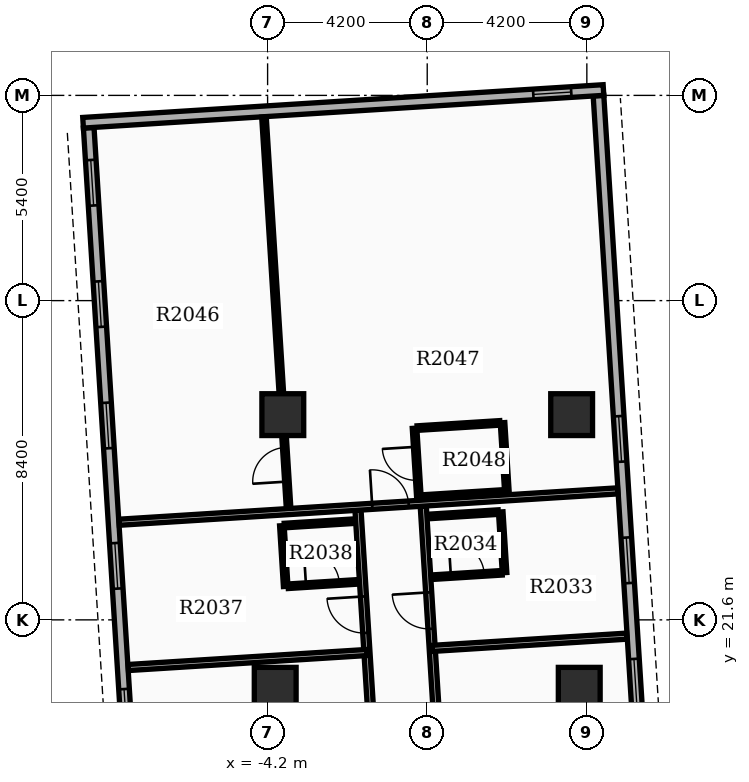
"""IFC4 building model, lengths in metres.
Left out: names, types, materials, properties, quantities, classifications, styles, units other than length and angle.
Written with IfcOpenShell. Run it as: python <this file> out.ifc"""

import sys

from ifc_helpers import new_model, si_unit, direction, frame, frame_2d, origin, origin_2d, place, context, subcontext, project, spatial, rectangle, extrude, element, fill, save


model = new_model("IFC4")
c1 = context("Model", 3, precision=1e-05, world=origin(), true_north=direction((0.0, 1.0)))
c2 = subcontext(c1, "Body", "Model", "MODEL_VIEW")
j1 = project(units=[si_unit("LENGTHUNIT", "METRE"), si_unit("PLANEANGLEUNIT", "RADIAN")], contexts=[c1])
p1 = place(None, origin())
s1 = spatial("IfcSite", under=j1, at=p1, CompositionType="ELEMENT")
p2 = place(p1, origin())
s2 = spatial("IfcBuilding", under=s1, at=p2, CompositionType="ELEMENT")
p3 = place(p2, frame((0.0, 0.0, 128.1)))
s3 = spatial("IfcBuildingStorey", under=s2, at=p3, CompositionType="ELEMENT", Elevation=128.1)
for number, where, z_axis, x_axis in (
    (1, (-4.0, 19.8, 0.0), (0.0, 0.0, 1.0), (1.0, 0.0, 0.0)),
    (2, (4.0, 19.8, 0.0), (0.0, 0.0, 1.0), (1.0, 0.0, 0.0)),
    (3, (-3.8, 27.0, 0.0), (0.0, 0.0, 1.0), (1.0, 0.0, 0.0)),
    (4, (3.8, 27.0, 0.0), (0.0, 0.0, 1.0), (1.0, 0.0, 0.0)),
):
    element("IfcColumn", number, at=place(p3, frame(where, z_axis=z_axis, x_axis=x_axis)), inside=s3, PredefinedType="COLUMN", context=c2, shape_type="SweptSolid", body=[
        extrude(rectangle(XDim=1.1, YDim=1.1, at=origin_2d()), origin(), (0.0, 0.0, 1.0), 3.9),
    ])
p4 = place(p3, frame((5.769, 15.333, 0.0), z_axis=(0.0, 0.0, 1.0), x_axis=(-0.062784355807, 0.998027116198, 0.0)))
e5 = element("IfcWall", 5, at=p4, inside=s3, PredefinedType="STANDARD", context=c2, shape_type="SweptSolid", body=[
    extrude(rectangle(XDim=20.1, YDim=0.28, at=frame_2d((10.05, 0.0))), origin(), (0.0, 0.0, 1.0), 2.97),
])
p5 = place(p4, frame((0.85, 0.0, 0.8)))
e6 = element("IfcOpeningElement", 6, at=p5, cuts=e5, PredefinedType="OPENING", context=c2, shape_type="SweptSolid", body=[
    extrude(rectangle(XDim=1.2, YDim=1.6, at=frame_2d((0.6, 0.8))), frame((0.0, 0.15, 0.0), z_axis=(0.0, -1.0, 0.0), x_axis=(1.0, 0.0, 0.0)), (0.0, 0.0, 1.0), 0.3),
])
p6 = place(p4, frame((4.05, 0.0, 0.8)))
e7 = element("IfcOpeningElement", 7, at=p6, cuts=e5, PredefinedType="OPENING", context=c2, shape_type="SweptSolid", body=[
    extrude(rectangle(XDim=1.2, YDim=1.6, at=frame_2d((0.6, 0.8))), frame((0.0, 0.15, 0.0), z_axis=(0.0, -1.0, 0.0), x_axis=(1.0, 0.0, 0.0)), (0.0, 0.0, 1.0), 0.3),
])
p7 = place(p4, frame((7.25, 0.0, 0.8)))
e8 = element("IfcOpeningElement", 8, at=p7, cuts=e5, PredefinedType="OPENING", context=c2, shape_type="SweptSolid", body=[
    extrude(rectangle(XDim=1.2, YDim=1.6, at=frame_2d((0.6, 0.8))), frame((0.0, 0.15, 0.0), z_axis=(0.0, -1.0, 0.0), x_axis=(1.0, 0.0, 0.0)), (0.0, 0.0, 1.0), 0.3),
])
p8 = place(p4, frame((10.45, 0.0, 0.8)))
e9 = element("IfcOpeningElement", 9, at=p8, cuts=e5, PredefinedType="OPENING", context=c2, shape_type="SweptSolid", body=[
    extrude(rectangle(XDim=1.2, YDim=1.6, at=frame_2d((0.6, 0.8))), frame((0.0, 0.15, 0.0), z_axis=(0.0, -1.0, 0.0), x_axis=(1.0, 0.0, 0.0)), (0.0, 0.0, 1.0), 0.3),
])
p9 = place(p3, frame((-8.907, 34.549, 0.0), z_axis=(0.0, 0.0, 1.0), x_axis=(0.06279645424, -0.99802635503, 0.0)))
e10 = element("IfcWall", 10, at=p9, inside=s3, PredefinedType="STANDARD", context=c2, shape_type="SweptSolid", body=[
    extrude(rectangle(XDim=20.1, YDim=0.28, at=frame_2d((10.05, 0.0))), origin(), (0.0, 0.0, 1.0), 2.97),
])
p10 = place(p9, frame((0.85, 0.0, 0.8)))
e11 = element("IfcOpeningElement", 11, at=p10, cuts=e10, PredefinedType="OPENING", context=c2, shape_type="SweptSolid", body=[
    extrude(rectangle(XDim=1.2, YDim=1.6, at=frame_2d((0.6, 0.8))), frame((0.0, 0.15, 0.0), z_axis=(0.0, -1.0, 0.0), x_axis=(1.0, 0.0, 0.0)), (0.0, 0.0, 1.0), 0.3),
])
p11 = place(p9, frame((4.05, 0.0, 0.8)))
e12 = element("IfcOpeningElement", 12, at=p11, cuts=e10, PredefinedType="OPENING", context=c2, shape_type="SweptSolid", body=[
    extrude(rectangle(XDim=1.2, YDim=1.6, at=frame_2d((0.6, 0.8))), frame((0.0, 0.15, 0.0), z_axis=(0.0, -1.0, 0.0), x_axis=(1.0, 0.0, 0.0)), (0.0, 0.0, 1.0), 0.3),
])
p12 = place(p9, frame((7.25, 0.0, 0.8)))
e13 = element("IfcOpeningElement", 13, at=p12, cuts=e10, PredefinedType="OPENING", context=c2, shape_type="SweptSolid", body=[
    extrude(rectangle(XDim=1.2, YDim=1.6, at=frame_2d((0.6, 0.8))), frame((0.0, 0.15, 0.0), z_axis=(0.0, -1.0, 0.0), x_axis=(1.0, 0.0, 0.0)), (0.0, 0.0, 1.0), 0.3),
])
p13 = place(p9, frame((10.95, 0.0, 0.8)))
e14 = element("IfcOpeningElement", 14, at=p13, cuts=e10, PredefinedType="OPENING", context=c2, shape_type="SweptSolid", body=[
    extrude(rectangle(XDim=1.2, YDim=1.6, at=frame_2d((0.6, 0.8))), frame((0.0, 0.15, 0.0), z_axis=(0.0, -1.0, 0.0), x_axis=(1.0, 0.0, 0.0)), (0.0, 0.0, 1.0), 0.3),
])
p14 = place(p9, frame((14.799, 0.0, 0.85)))
e15 = element("IfcOpeningElement", 15, at=p14, cuts=e10, PredefinedType="OPENING", context=c2, shape_type="SweptSolid", body=[
    extrude(rectangle(XDim=1.2, YDim=1.6, at=frame_2d((0.6, 0.8))), frame((0.0, 0.15, 0.0), z_axis=(0.0, -1.0, 0.0), x_axis=(1.0, 0.0, 0.0)), (0.0, 0.0, 1.0), 0.3),
])
p15 = place(p3, frame((4.637, 35.541, 0.0), z_axis=(0.0, 0.0, 1.0), x_axis=(-0.998026318072, -0.062797041623, 0.0)))
e16 = element("IfcWall", 16, at=p15, inside=s3, PredefinedType="STANDARD", context=c2, shape_type="SweptSolid", body=[
    extrude(rectangle(XDim=13.72, YDim=0.28, at=frame_2d((6.86, 0.0))), origin(), (0.0, 0.0, 1.0), 2.97),
])
p16 = place(p15, frame((0.85, 0.0, 0.85)))
e17 = element("IfcOpeningElement", 17, at=p16, cuts=e16, PredefinedType="OPENING", context=c2, shape_type="SweptSolid", body=[
    extrude(rectangle(XDim=1.0, YDim=1.5, at=frame_2d((0.5, 0.75))), frame((0.0, 0.15, 0.0), z_axis=(0.0, -1.0, 0.0), x_axis=(1.0, 0.0, 0.0)), (0.0, 0.0, 1.0), 0.3),
])
p17 = place(p3, frame((0.505, 14.911, 0.0), z_axis=(0.0, 0.0, 1.0), x_axis=(-0.062771584278, 0.998027919553, 0.0)))
e18 = element("IfcWall", 18, at=p17, inside=s3, PredefinedType="PARTITIONING", context=c2, shape_type="SweptSolid", body=[
    extrude(rectangle(XDim=9.7, YDim=0.16, at=frame_2d((4.85, 0.0))), origin(), (0.0, 0.0, 1.0), 2.96),
])
p18 = place(p17, frame((2.575, 0.0, 0.0)))
e19 = element("IfcOpeningElement", 19, at=p18, cuts=e18, PredefinedType="OPENING", context=c2, shape_type="SweptSolid", body=[
    extrude(rectangle(XDim=0.96, YDim=2.15, at=frame_2d((0.48, 1.075))), frame((0.0, 0.09, 0.0), z_axis=(0.0, -1.0, 0.0), x_axis=(1.0, 0.0, 0.0)), (0.0, 0.0, 1.0), 0.18),
])
p19 = place(p17, frame((6.467, 0.0, 0.0)))
e20 = element("IfcOpeningElement", 20, at=p19, cuts=e18, PredefinedType="OPENING", context=c2, shape_type="SweptSolid", body=[
    extrude(rectangle(XDim=0.96, YDim=2.15, at=frame_2d((0.48, 1.075))), frame((0.0, 0.09, 0.0), z_axis=(0.0, -1.0, 0.0), x_axis=(1.0, 0.0, 0.0)), (0.0, 0.0, 1.0), 0.18),
])
p20 = place(p3, frame((0.131, 20.849, 0.0), z_axis=(0.0, 0.0, 1.0), x_axis=(0.998026390953, 0.062795883315, 0.0)))
e21 = element("IfcWall", 21, at=p20, inside=s3, PredefinedType="PARTITIONING", context=c2, shape_type="SweptSolid", body=[
    extrude(rectangle(XDim=5.132, YDim=0.16, at=frame_2d((2.566, 0.0))), origin(), (0.0, 0.0, 1.0), 2.96),
])
p21 = place(p3, frame((0.153, 22.725, 0.0), z_axis=(0.0, 0.0, 1.0), x_axis=(0.998027443946, 0.062779145668, 0.0)))
e22 = element("IfcWall", 22, at=p21, inside=s3, PredefinedType="PARTITIONING", context=c2, shape_type="SweptSolid", body=[
    extrude(rectangle(XDim=1.82, YDim=0.12, at=frame_2d((0.91, 0.0))), origin(), (0.0, 0.0, 1.0), 2.96),
])
p22 = place(p21, frame((0.47, 0.0, 0.0)))
e23 = element("IfcOpeningElement", 23, at=p22, cuts=e22, PredefinedType="OPENING", context=c2, shape_type="SweptSolid", body=[
    extrude(rectangle(XDim=0.88, YDim=2.1, at=frame_2d((0.44, 1.05))), frame((0.0, 0.07, 0.0), z_axis=(0.0, -1.0, 0.0), x_axis=(1.0, 0.0, 0.0)), (0.0, 0.0, 1.0), 0.14),
])
p23 = place(p3, frame((0.053, 24.321, 0.0), z_axis=(0.0, 0.0, 1.0), x_axis=(0.998027443946, 0.062779145668, 0.0)))
e24 = element("IfcWall", 24, at=p23, inside=s3, PredefinedType="PARTITIONING", context=c2, shape_type="SweptSolid", body=[
    extrude(rectangle(XDim=1.82, YDim=0.12, at=frame_2d((0.91, 0.0))), origin(), (0.0, 0.0, 1.0), 2.96),
])
p24 = place(p3, frame((2.035, 22.843, 0.0), z_axis=(0.0, 0.0, 1.0), x_axis=(-0.062862733403, 0.998022182494, 0.0)))
e25 = element("IfcWall", 25, at=p24, inside=s3, PredefinedType="PARTITIONING", context=c2, shape_type="SweptSolid", body=[
    extrude(rectangle(XDim=1.6, YDim=0.12, at=frame_2d((0.8, 0.0))), origin(), (0.0, 0.0, 1.0), 2.96),
])
p25 = place(p3, frame((-1.212, 14.803, 0.0), z_axis=(0.0, 0.0, 1.0), x_axis=(-0.062796654085, 0.998026342456, 0.0)))
e26 = element("IfcWall", 26, at=p25, inside=s3, PredefinedType="PARTITIONING", context=c2, shape_type="SweptSolid", body=[
    extrude(rectangle(XDim=9.7, YDim=0.16, at=frame_2d((4.85, 0.0))), origin(), (0.0, 0.0, 1.0), 2.96),
])
p26 = place(p25, frame((2.575, 0.0, 0.0)))
e27 = element("IfcOpeningElement", 27, at=p26, cuts=e26, PredefinedType="OPENING", context=c2, shape_type="SweptSolid", body=[
    extrude(rectangle(XDim=0.96, YDim=2.15, at=frame_2d((0.48, 1.075))), frame((0.0, 0.09, 0.0), z_axis=(0.0, -1.0, 0.0), x_axis=(1.0, 0.0, 0.0)), (0.0, 0.0, 1.0), 0.18),
])
p27 = place(p25, frame((6.467, 0.0, 0.0)))
e28 = element("IfcOpeningElement", 28, at=p27, cuts=e26, PredefinedType="OPENING", context=c2, shape_type="SweptSolid", body=[
    extrude(rectangle(XDim=0.96, YDim=2.15, at=frame_2d((0.48, 1.075))), frame((0.0, 0.09, 0.0), z_axis=(0.0, -1.0, 0.0), x_axis=(1.0, 0.0, 0.0)), (0.0, 0.0, 1.0), 0.18),
])
p28 = place(p3, frame((-1.585, 20.741, 0.0), z_axis=(0.0, 0.0, 1.0), x_axis=(-0.998024851178, -0.062820350455, 0.0)))
e29 = element("IfcWall", 29, at=p28, inside=s3, PredefinedType="PARTITIONING", context=c2, shape_type="SweptSolid", body=[
    extrude(rectangle(XDim=6.292, YDim=0.16, at=frame_2d((3.146, 0.0))), origin(), (0.0, 0.0, 1.0), 2.96),
])
p29 = place(p3, frame((-3.659, 22.485, 0.0), z_axis=(0.0, 0.0, 1.0), x_axis=(0.998027443946, 0.062779145668, 0.0)))
e30 = element("IfcWall", 30, at=p29, inside=s3, PredefinedType="PARTITIONING", context=c2, shape_type="SweptSolid", body=[
    extrude(rectangle(XDim=1.82, YDim=0.12, at=frame_2d((0.91, 0.0))), origin(), (0.0, 0.0, 1.0), 2.96),
])
p30 = place(p29, frame((0.47, 0.0, 0.0)))
e31 = element("IfcOpeningElement", 31, at=p30, cuts=e30, PredefinedType="OPENING", context=c2, shape_type="SweptSolid", body=[
    extrude(rectangle(XDim=0.88, YDim=2.1, at=frame_2d((0.44, 1.05))), frame((0.0, 0.07, 0.0), z_axis=(0.0, -1.0, 0.0), x_axis=(1.0, 0.0, 0.0)), (0.0, 0.0, 1.0), 0.14),
])
p31 = place(p3, frame((-3.76, 24.082, 0.0), z_axis=(0.0, 0.0, 1.0), x_axis=(0.998027443946, 0.062779145668, 0.0)))
e32 = element("IfcWall", 32, at=p31, inside=s3, PredefinedType="PARTITIONING", context=c2, shape_type="SweptSolid", body=[
    extrude(rectangle(XDim=1.82, YDim=0.12, at=frame_2d((0.91, 0.0))), origin(), (0.0, 0.0, 1.0), 2.96),
])
p32 = place(p3, frame((-3.724, 22.48, 0.0), z_axis=(0.0, 0.0, 1.0), x_axis=(-0.062862733403, 0.998022182494, 0.0)))
e33 = element("IfcWall", 33, at=p32, inside=s3, PredefinedType="PARTITIONING", context=c2, shape_type="SweptSolid", body=[
    extrude(rectangle(XDim=1.6, YDim=0.12, at=frame_2d((0.8, 0.0))), origin(), (0.0, 0.0, 1.0), 2.96),
])
p33 = place(p3, frame((-8.105, 24.169, 0.0), z_axis=(0.0, 0.0, 1.0), x_axis=(0.998026109115, 0.062800362452, 0.0)))
e34 = element("IfcWall", 34, at=p33, inside=s3, PredefinedType="PARTITIONING", context=c2, shape_type="SweptSolid", body=[
    extrude(rectangle(XDim=13.144, YDim=0.16, at=frame_2d((6.572, 0.0))), origin(), (0.0, 0.0, 1.0), 2.96),
])
p34 = place(p33, frame((6.672, 0.0, 0.0)))
e35 = element("IfcOpeningElement", 35, at=p34, cuts=e34, PredefinedType="OPENING", context=c2, shape_type="SweptSolid", body=[
    extrude(rectangle(XDim=0.96, YDim=2.15, at=frame_2d((0.48, 1.075))), frame((0.0, 0.09, 0.0), z_axis=(0.0, -1.0, 0.0), x_axis=(1.0, 0.0, 0.0)), (0.0, 0.0, 1.0), 0.18),
])
p35 = place(p3, frame((-3.648, 24.539, 0.0), z_axis=(0.0, 0.0, 1.0), x_axis=(-0.062786562543, 0.998026977373, 0.0)))
e36 = element("IfcWall", 36, at=p35, inside=s3, PredefinedType="PARTITIONING", context=c2, shape_type="SweptSolid", body=[
    extrude(rectangle(XDim=10.312, YDim=0.12, at=frame_2d((5.156, 0.0))), origin(), (0.0, 0.0, 1.0), 2.96),
])
p36 = place(p35, frame((0.7, 0.0, 0.0)))
e37 = element("IfcOpeningElement", 37, at=p36, cuts=e36, PredefinedType="OPENING", context=c2, shape_type="SweptSolid", body=[
    extrude(rectangle(XDim=0.9, YDim=2.1, at=frame_2d((0.45, 1.05))), frame((0.0, 0.07, 0.0), z_axis=(0.0, -1.0, 0.0), x_axis=(1.0, 0.0, 0.0)), (0.0, 0.0, 1.0), 0.14),
])
p37 = place(p3, frame((-0.219, 24.825, 0.0), z_axis=(0.0, 0.0, 1.0), x_axis=(-0.062779145668, 0.998027443946, 0.0)))
e38 = element("IfcWall", 38, at=p37, inside=s3, PredefinedType="PARTITIONING", context=c2, shape_type="SweptSolid", body=[
    extrude(rectangle(XDim=1.82, YDim=0.12, at=frame_2d((0.91, 0.0))), origin(), (0.0, 0.0, 1.0), 2.96),
])
p38 = place(p37, frame((0.45, 0.0, 0.0)))
e39 = element("IfcOpeningElement", 39, at=p38, cuts=e38, PredefinedType="OPENING", context=c2, shape_type="SweptSolid", body=[
    extrude(rectangle(XDim=0.88, YDim=2.1, at=frame_2d((0.44, 1.05))), frame((0.0, 0.07, 0.0), z_axis=(0.0, -1.0, 0.0), x_axis=(1.0, 0.0, 0.0)), (0.0, 0.0, 1.0), 0.14),
])
p39 = place(p3, frame((2.096, 24.971, 0.0), z_axis=(0.0, 0.0, 1.0), x_axis=(-0.062779145668, 0.998027443946, 0.0)))
e40 = element("IfcWall", 40, at=p39, inside=s3, PredefinedType="PARTITIONING", context=c2, shape_type="SweptSolid", body=[
    extrude(rectangle(XDim=1.82, YDim=0.12, at=frame_2d((0.91, 0.0))), origin(), (0.0, 0.0, 1.0), 2.96),
])
for number, where, z_axis, x_axis in (
    (41, (-0.149, 24.83, 0.0), (0.0, 0.0, 1.0), (0.998, 0.063, 0.0)),
    (42, (-0.264, 26.646, 0.0), (0.0, 0.0, 1.0), (0.998, 0.063, 0.0)),
):
    element("IfcWall", number, at=place(p3, frame(where, z_axis=z_axis, x_axis=x_axis)), inside=s3, PredefinedType="PARTITIONING", context=c2, shape_type="SweptSolid", body=[
        extrude(rectangle(XDim=2.18, YDim=0.12, at=frame_2d((1.09, 0.0))), origin(), (0.0, 0.0, 1.0), 2.96),
    ])
p40 = place(p6, origin())
e43 = element("IfcWindow", 43, at=p40, inside=s3, PartitioningType="SINGLE_PANEL", PredefinedType="WINDOW", context=c2, shape_type="SweptSolid", body=[
    extrude(rectangle(XDim=1.2, YDim=1.6, at=frame_2d((0.6, 0.8))), frame((0.0, 0.03, 0.0), z_axis=(0.0, -1.0, 0.0), x_axis=(1.0, 0.0, 0.0)), (0.0, 0.0, 1.0), 0.06),
])
fill(e7, e43)
p41 = place(p7, origin())
e44 = element("IfcWindow", 44, at=p41, inside=s3, PartitioningType="SINGLE_PANEL", PredefinedType="WINDOW", context=c2, shape_type="SweptSolid", body=[
    extrude(rectangle(XDim=1.2, YDim=1.6, at=frame_2d((0.6, 0.8))), frame((0.0, 0.03, 0.0), z_axis=(0.0, -1.0, 0.0), x_axis=(1.0, 0.0, 0.0)), (0.0, 0.0, 1.0), 0.06),
])
fill(e8, e44)
p42 = place(p8, origin())
e45 = element("IfcWindow", 45, at=p42, inside=s3, PartitioningType="SINGLE_PANEL", PredefinedType="WINDOW", context=c2, shape_type="SweptSolid", body=[
    extrude(rectangle(XDim=1.2, YDim=1.6, at=frame_2d((0.6, 0.8))), frame((0.0, 0.03, 0.0), z_axis=(0.0, -1.0, 0.0), x_axis=(1.0, 0.0, 0.0)), (0.0, 0.0, 1.0), 0.06),
])
fill(e9, e45)
p43 = place(p10, origin())
e46 = element("IfcWindow", 46, at=p43, inside=s3, PartitioningType="SINGLE_PANEL", PredefinedType="WINDOW", context=c2, shape_type="SweptSolid", body=[
    extrude(rectangle(XDim=1.2, YDim=1.6, at=frame_2d((0.6, 0.8))), frame((0.0, 0.03, 0.0), z_axis=(0.0, -1.0, 0.0), x_axis=(1.0, 0.0, 0.0)), (0.0, 0.0, 1.0), 0.06),
])
fill(e11, e46)
p44 = place(p11, origin())
e47 = element("IfcWindow", 47, at=p44, inside=s3, PartitioningType="SINGLE_PANEL", PredefinedType="WINDOW", context=c2, shape_type="SweptSolid", body=[
    extrude(rectangle(XDim=1.2, YDim=1.6, at=frame_2d((0.6, 0.8))), frame((0.0, 0.03, 0.0), z_axis=(0.0, -1.0, 0.0), x_axis=(1.0, 0.0, 0.0)), (0.0, 0.0, 1.0), 0.06),
])
fill(e12, e47)
p45 = place(p12, origin())
e48 = element("IfcWindow", 48, at=p45, inside=s3, PartitioningType="SINGLE_PANEL", PredefinedType="WINDOW", context=c2, shape_type="SweptSolid", body=[
    extrude(rectangle(XDim=1.2, YDim=1.6, at=frame_2d((0.6, 0.8))), frame((0.0, 0.03, 0.0), z_axis=(0.0, -1.0, 0.0), x_axis=(1.0, 0.0, 0.0)), (0.0, 0.0, 1.0), 0.06),
])
fill(e13, e48)
p46 = place(p13, origin())
e49 = element("IfcWindow", 49, at=p46, inside=s3, PartitioningType="SINGLE_PANEL", PredefinedType="WINDOW", context=c2, shape_type="SweptSolid", body=[
    extrude(rectangle(XDim=1.2, YDim=1.6, at=frame_2d((0.6, 0.8))), frame((0.0, 0.03, 0.0), z_axis=(0.0, -1.0, 0.0), x_axis=(1.0, 0.0, 0.0)), (0.0, 0.0, 1.0), 0.06),
])
fill(e14, e49)
p47 = place(p16, origin())
e50 = element("IfcWindow", 50, at=p47, inside=s3, PartitioningType="SINGLE_PANEL", PredefinedType="WINDOW", context=c2, shape_type="SweptSolid", body=[
    extrude(rectangle(XDim=1.0, YDim=1.5, at=frame_2d((0.5, 0.75))), frame((0.0, 0.03, 0.0), z_axis=(0.0, -1.0, 0.0), x_axis=(1.0, 0.0, 0.0)), (0.0, 0.0, 1.0), 0.06),
])
fill(e17, e50)
p48 = place(p14, origin())
e51 = element("IfcWindow", 51, at=p48, inside=s3, PartitioningType="SINGLE_PANEL", PredefinedType="WINDOW", context=c2, shape_type="SweptSolid", body=[
    extrude(rectangle(XDim=1.2, YDim=1.6, at=frame_2d((0.6, 0.8))), frame((0.0, 0.03, 0.0), z_axis=(0.0, -1.0, 0.0), x_axis=(1.0, 0.0, 0.0)), (0.0, 0.0, 1.0), 0.06),
])
fill(e15, e51)
p49 = place(p19, origin())
e52 = element("IfcDoor", 52, at=p49, inside=s3, OperationType="SINGLE_SWING_RIGHT", PredefinedType="DOOR", context=c2, shape_type="SweptSolid", body=[
    extrude(rectangle(XDim=0.96, YDim=2.15, at=frame_2d((0.48, 1.075))), frame((0.0, 0.025, 0.0), z_axis=(0.0, -1.0, 0.0), x_axis=(1.0, 0.0, 0.0)), (0.0, 0.0, 1.0), 0.05),
])
fill(e20, e52)
p50 = place(p22, origin())
e53 = element("IfcDoor", 53, at=p50, inside=s3, OperationType="SINGLE_SWING_LEFT", PredefinedType="DOOR", context=c2, shape_type="SweptSolid", body=[
    extrude(rectangle(XDim=0.88, YDim=2.1, at=frame_2d((0.44, 1.05))), frame((0.0, 0.025, 0.0), z_axis=(0.0, -1.0, 0.0), x_axis=(1.0, 0.0, 0.0)), (0.0, 0.0, 1.0), 0.05),
])
fill(e23, e53)
p51 = place(p27, origin())
e54 = element("IfcDoor", 54, at=p51, inside=s3, OperationType="SINGLE_SWING_RIGHT", PredefinedType="DOOR", context=c2, shape_type="SweptSolid", body=[
    extrude(rectangle(XDim=0.96, YDim=2.15, at=frame_2d((0.48, 1.075))), frame((0.0, 0.025, 0.0), z_axis=(0.0, -1.0, 0.0), x_axis=(1.0, 0.0, 0.0)), (0.0, 0.0, 1.0), 0.05),
])
fill(e28, e54)
p52 = place(p30, origin())
e55 = element("IfcDoor", 55, at=p52, inside=s3, OperationType="SINGLE_SWING_LEFT", PredefinedType="DOOR", context=c2, shape_type="SweptSolid", body=[
    extrude(rectangle(XDim=0.88, YDim=2.1, at=frame_2d((0.44, 1.05))), frame((0.0, 0.025, 0.0), z_axis=(0.0, -1.0, 0.0), x_axis=(1.0, 0.0, 0.0)), (0.0, 0.0, 1.0), 0.05),
])
fill(e31, e55)
p53 = place(p34, origin())
e56 = element("IfcDoor", 56, at=p53, inside=s3, OperationType="SINGLE_SWING_LEFT", PredefinedType="DOOR", context=c2, shape_type="SweptSolid", body=[
    extrude(rectangle(XDim=0.96, YDim=2.15, at=frame_2d((0.48, 1.075))), frame((0.0, 0.025, 0.0), z_axis=(0.0, -1.0, 0.0), x_axis=(1.0, 0.0, 0.0)), (0.0, 0.0, 1.0), 0.05),
])
fill(e35, e56)
p54 = place(p36, origin())
e57 = element("IfcDoor", 57, at=p54, inside=s3, OperationType="SINGLE_SWING_LEFT", PredefinedType="DOOR", context=c2, shape_type="SweptSolid", body=[
    extrude(rectangle(XDim=0.9, YDim=2.1, at=frame_2d((0.45, 1.05))), frame((0.0, 0.025, 0.0), z_axis=(0.0, -1.0, 0.0), x_axis=(1.0, 0.0, 0.0)), (0.0, 0.0, 1.0), 0.05),
])
fill(e37, e57)
p55 = place(p38, origin())
e58 = element("IfcDoor", 58, at=p55, inside=s3, OperationType="SINGLE_SWING_RIGHT", PredefinedType="DOOR", context=c2, shape_type="SweptSolid", body=[
    extrude(rectangle(XDim=0.88, YDim=2.1, at=frame_2d((0.44, 1.05))), frame((0.0, 0.025, 0.0), z_axis=(0.0, -1.0, 0.0), x_axis=(1.0, 0.0, 0.0)), (0.0, 0.0, 1.0), 0.05),
])
fill(e39, e58)
save(model, sys.argv[1])
